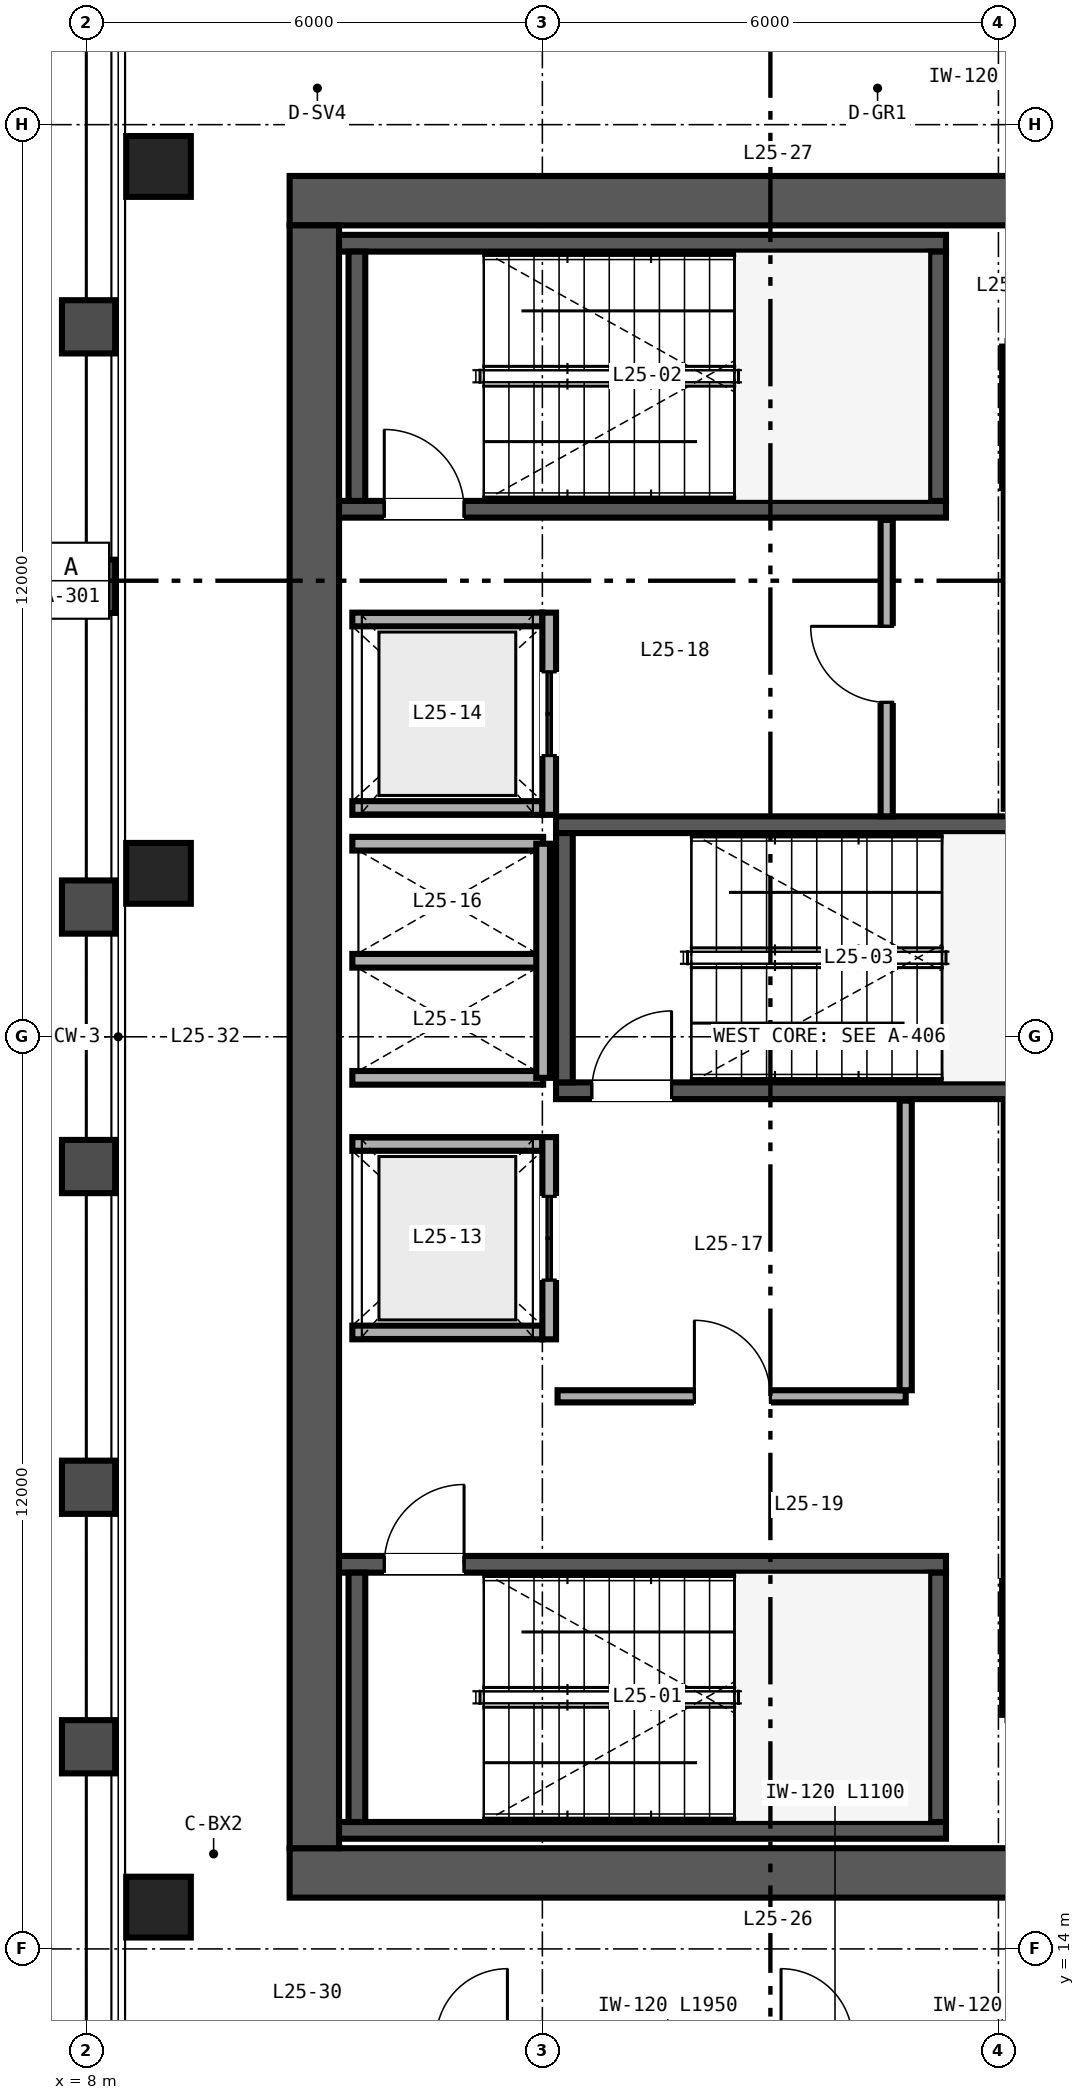
"""IFC4 building model, lengths in metres.
Left out: names, types, materials, properties, quantities, classifications, styles, units other than length and angle.
Written with IfcOpenShell. Run it as: python <this file> out.ifc"""

import sys

from ifc_helpers import new_model, si_unit, direction, frame, frame_2d, origin, origin_2d, place, context, subcontext, project, spatial, rectangle, hollow_rectangle, extrude, source, transform, mapped, element, fill, save


model = new_model("IFC4")
c1 = context("Model", 3, precision=1e-05, world=origin(), true_north=direction((0.0, 1.0)))
c2 = subcontext(c1, "Body", "Model", "MODEL_VIEW")
j1 = project(units=[si_unit("LENGTHUNIT", "METRE"), si_unit("PLANEANGLEUNIT", "RADIAN")], contexts=[c1])
p1 = place(None, origin())
s1 = spatial("IfcSite", under=j1, at=p1, CompositionType="ELEMENT")
p2 = place(p1, origin())
s2 = spatial("IfcBuilding", under=s1, at=p2, CompositionType="ELEMENT")
p3 = place(p2, frame((0.0, 0.0, 104.4)))
s3 = spatial("IfcBuildingStorey", under=s2, at=p3, CompositionType="ELEMENT", Elevation=104.4)
p4 = place(p3, frame((10.675, 15.0, 0.0), z_axis=(0.0, 0.0, 1.0), x_axis=(1.0, 0.0, 0.0)))
e1 = element("IfcWall", 1, at=p4, inside=s3, PredefinedType="SHEAR", context=c2, shape_type="SweptSolid", body=[
    extrude(rectangle(XDim=12.65, YDim=0.65, at=frame_2d((6.325, 0.0))), origin(), (0.0, 0.0, 1.0), 3.36),
])
p5 = place(p4, frame((10.225, 0.0, 0.0)))
e2 = element("IfcOpeningElement", 2, at=p5, cuts=e1, PredefinedType="OPENING", context=c2, shape_type="SweptSolid", body=[
    extrude(rectangle(XDim=1.0, YDim=2.15, at=frame_2d((0.5, 1.075))), frame((0.0, 0.335, 0.0), z_axis=(0.0, -1.0, 0.0), x_axis=(1.0, 0.0, 0.0)), (0.0, 0.0, 1.0), 0.67),
])
p6 = place(p3, frame((10.675, 37.0, 0.0), z_axis=(0.0, 0.0, 1.0), x_axis=(1.0, 0.0, 0.0)))
e3 = element("IfcWall", 3, at=p6, inside=s3, PredefinedType="SHEAR", context=c2, shape_type="SweptSolid", body=[
    extrude(rectangle(XDim=12.65, YDim=0.65, at=frame_2d((6.325, 0.0))), origin(), (0.0, 0.0, 1.0), 3.36),
])
p7 = place(p6, frame((10.425, 0.0, 0.0)))
e4 = element("IfcOpeningElement", 4, at=p7, cuts=e3, PredefinedType="OPENING", context=c2, shape_type="SweptSolid", body=[
    extrude(rectangle(XDim=1.0, YDim=2.15, at=frame_2d((0.5, 1.075))), frame((0.0, 0.335, 0.0), z_axis=(0.0, -1.0, 0.0), x_axis=(1.0, 0.0, 0.0)), (0.0, 0.0, 1.0), 0.67),
])
p8 = place(p3, frame((11.0, 15.325, 0.0), z_axis=(0.0, 0.0, 1.0), x_axis=(0.0, 1.0, 0.0)))
e5 = element("IfcWall", 5, at=p8, inside=s3, PredefinedType="SHEAR", context=c2, shape_type="SweptSolid", body=[
    extrude(rectangle(XDim=21.35, YDim=0.65, at=frame_2d((10.675, 0.0))), origin(), (0.0, 0.0, 1.0), 3.36),
])
p9 = place(p3, frame((11.325, 15.56, 0.0), z_axis=(0.0, 0.0, 1.0), x_axis=(1.0, 0.0, 0.0)))
e6 = element("IfcWall", 6, at=p9, inside=s3, PredefinedType="SHEAR", context=c2, shape_type="SweptSolid", body=[
    extrude(rectangle(XDim=7.985, YDim=0.22, at=frame_2d((3.993, 0.0))), origin(), (0.0, 0.0, 1.0), 3.4),
])
p10 = place(p3, frame((11.325, 19.06, 0.0), z_axis=(0.0, 0.0, 1.0), x_axis=(1.0, 0.0, 0.0)))
e7 = element("IfcWall", 7, at=p10, inside=s3, PredefinedType="SHEAR", context=c2, shape_type="SweptSolid", body=[
    extrude(rectangle(XDim=7.985, YDim=0.22, at=frame_2d((3.993, 0.0))), origin(), (0.0, 0.0, 1.0), 3.4),
])
p11 = place(p10, frame((0.595, 0.0, 0.0)))
e8 = element("IfcOpeningElement", 8, at=p11, cuts=e7, PredefinedType="OPENING", context=c2, shape_type="SweptSolid", body=[
    extrude(rectangle(XDim=1.05, YDim=2.15, at=frame_2d((0.525, 1.075))), frame((0.0, 0.12, 0.0), z_axis=(0.0, -1.0, 0.0), x_axis=(1.0, 0.0, 0.0)), (0.0, 0.0, 1.0), 0.24),
])
for number, where, z_axis, x_axis in (
    (9, (11.56, 15.67, 0.0), (0.0, 0.0, 1.0), (0.0, 1.0, 0.0)),
    (10, (19.2, 15.67, 0.0), (0.0, 0.0, 1.0), (0.0, 1.0, 0.0)),
):
    element("IfcWall", number, at=place(p3, frame(where, z_axis=z_axis, x_axis=x_axis)), inside=s3, PredefinedType="SHEAR", context=c2, shape_type="SweptSolid", body=[
        extrude(rectangle(XDim=3.28, YDim=0.22, at=frame_2d((1.64, 0.0))), origin(), (0.0, 0.0, 1.0), 3.4),
    ])
p12 = place(p3, frame((11.325, 32.94, 0.0), z_axis=(0.0, 0.0, 1.0), x_axis=(1.0, 0.0, 0.0)))
e11 = element("IfcWall", 11, at=p12, inside=s3, PredefinedType="SHEAR", context=c2, shape_type="SweptSolid", body=[
    extrude(rectangle(XDim=7.985, YDim=0.22, at=frame_2d((3.993, 0.0))), origin(), (0.0, 0.0, 1.0), 3.4),
])
p13 = place(p12, frame((0.595, 0.0, 0.0)))
e12 = element("IfcOpeningElement", 12, at=p13, cuts=e11, PredefinedType="OPENING", context=c2, shape_type="SweptSolid", body=[
    extrude(rectangle(XDim=1.05, YDim=2.15, at=frame_2d((0.525, 1.075))), frame((0.0, 0.12, 0.0), z_axis=(0.0, -1.0, 0.0), x_axis=(1.0, 0.0, 0.0)), (0.0, 0.0, 1.0), 0.24),
])
p14 = place(p3, frame((11.325, 36.44, 0.0), z_axis=(0.0, 0.0, 1.0), x_axis=(1.0, 0.0, 0.0)))
e13 = element("IfcWall", 13, at=p14, inside=s3, PredefinedType="SHEAR", context=c2, shape_type="SweptSolid", body=[
    extrude(rectangle(XDim=7.985, YDim=0.22, at=frame_2d((3.993, 0.0))), origin(), (0.0, 0.0, 1.0), 3.4),
])
for number, where, z_axis, x_axis in (
    (14, (11.56, 33.05, 0.0), (0.0, 0.0, 1.0), (0.0, 1.0, 0.0)),
    (15, (19.2, 33.05, 0.0), (0.0, 0.0, 1.0), (0.0, 1.0, 0.0)),
):
    element("IfcWall", number, at=place(p3, frame(where, z_axis=z_axis, x_axis=x_axis)), inside=s3, PredefinedType="SHEAR", context=c2, shape_type="SweptSolid", body=[
        extrude(rectangle(XDim=3.28, YDim=0.22, at=frame_2d((1.64, 0.0))), origin(), (0.0, 0.0, 1.0), 3.4),
    ])
p15 = place(p3, frame((14.18, 25.29, 0.0), z_axis=(0.0, 0.0, 1.0), x_axis=(1.0, 0.0, 0.0)))
e16 = element("IfcWall", 16, at=p15, inside=s3, PredefinedType="SHEAR", context=c2, shape_type="SweptSolid", body=[
    extrude(rectangle(XDim=8.495, YDim=0.22, at=frame_2d((4.248, 0.0))), origin(), (0.0, 0.0, 1.0), 3.4),
])
p16 = place(p15, frame((0.47, 0.0, 0.0)))
e17 = element("IfcOpeningElement", 17, at=p16, cuts=e16, PredefinedType="OPENING", context=c2, shape_type="SweptSolid", body=[
    extrude(rectangle(XDim=1.05, YDim=2.15, at=frame_2d((0.525, 1.075))), frame((0.0, 0.12, 0.0), z_axis=(0.0, -1.0, 0.0), x_axis=(1.0, 0.0, 0.0)), (0.0, 0.0, 1.0), 0.24),
])
p17 = place(p3, frame((14.18, 28.79, 0.0), z_axis=(0.0, 0.0, 1.0), x_axis=(1.0, 0.0, 0.0)))
e18 = element("IfcWall", 18, at=p17, inside=s3, PredefinedType="SHEAR", context=c2, shape_type="SweptSolid", body=[
    extrude(rectangle(XDim=8.495, YDim=0.22, at=frame_2d((4.248, 0.0))), origin(), (0.0, 0.0, 1.0), 3.4),
])
p18 = place(p3, frame((14.29, 25.4, 0.0), z_axis=(0.0, 0.0, 1.0), x_axis=(0.0, 1.0, 0.0)))
e19 = element("IfcWall", 19, at=p18, inside=s3, PredefinedType="SHEAR", context=c2, shape_type="SweptSolid", body=[
    extrude(rectangle(XDim=3.28, YDim=0.22, at=frame_2d((1.64, 0.0))), origin(), (0.0, 0.0, 1.0), 3.4),
])
m1 = source(origin(), c2, "Body", "SweptSolid", [
    extrude(hollow_rectangle(XDim=0.85, YDim=0.8, WallThickness=0.032, at=origin_2d()), origin(), (0.0, 0.0, 1.0), 3.36),
])
for number, where, z_axis, x_axis in (
    (20, (8.95, 14.55, 0.0), (0.0, 0.0, 1.0), (1.0, 0.0, 0.0)),
    (21, (8.95, 28.15, 0.0), (0.0, 0.0, 1.0), (1.0, 0.0, 0.0)),
    (22, (8.95, 37.45, 0.0), (0.0, 0.0, 1.0), (1.0, 0.0, 0.0)),
):
    element("IfcColumn", number, at=place(p3, frame(where, z_axis=z_axis, x_axis=x_axis)), inside=s3, PredefinedType="COLUMN", context=c2, shape_type="MappedRepresentation", body=[
        mapped(m1, transform((0.0, 0.0, 0.0), scale=1.0)),
    ])
p19 = place(p3, frame((20.16, 18.82, 0.0), z_axis=(0.0, 0.0, 1.0), x_axis=(0.0, 1.0, 0.0)))
e23 = element("IfcWall", 23, at=p19, inside=s3, PredefinedType="SOLIDWALL", context=c2, shape_type="SweptSolid", body=[
    extrude(rectangle(XDim=6.32, YDim=0.18, at=frame_2d((3.16, 0.0))), origin(), (0.0, 0.0, 1.0), 2.36),
])
p20 = place(p3, frame((20.16, 29.0, 0.0), z_axis=(0.0, 0.0, 1.0), x_axis=(0.0, 1.0, 0.0)))
e24 = element("IfcWall", 24, at=p20, inside=s3, PredefinedType="SOLIDWALL", context=c2, shape_type="SweptSolid", body=[
    extrude(rectangle(XDim=4.29, YDim=0.18, at=frame_2d((2.145, 0.0))), origin(), (0.0, 0.0, 1.0), 3.36),
])
for number, where, z_axis, x_axis in (
    (25, (11.5, 22.11, 0.0), (0.0, 0.0, 1.0), (1.0, 0.0, 0.0)),
    (26, (11.5, 24.59, 0.0), (0.0, 0.0, 1.0), (1.0, 0.0, 0.0)),
):
    element("IfcWall", number, at=place(p3, frame(where, z_axis=z_axis, x_axis=x_axis)), inside=s3, PredefinedType="SOLIDWALL", context=c2, shape_type="SweptSolid", body=[
        extrude(rectangle(XDim=2.5, YDim=0.18, at=frame_2d((1.25, 0.0))), origin(), (0.0, 0.0, 1.0), 3.36),
    ])
p21 = place(p3, frame((14.09, 22.02, 0.0), z_axis=(0.0, 0.0, 1.0), x_axis=(0.0, 1.0, 0.0)))
e27 = element("IfcWall", 27, at=p21, inside=s3, PredefinedType="SOLIDWALL", context=c2, shape_type="SweptSolid", body=[
    extrude(rectangle(XDim=2.66, YDim=0.18, at=frame_2d((1.33, 0.0))), origin(), (0.0, 0.0, 1.0), 3.36),
])
p22 = place(p21, frame((0.78, 0.0, 0.0)))
e28 = element("IfcOpeningElement", 28, at=p22, cuts=e27, PredefinedType="OPENING", context=c2, shape_type="SweptSolid", body=[
    extrude(rectangle(XDim=1.1, YDim=2.2, at=frame_2d((0.55, 1.1))), frame((0.0, 0.1, 0.0), z_axis=(0.0, -1.0, 0.0), x_axis=(1.0, 0.0, 0.0)), (0.0, 0.0, 1.0), 0.2),
])
for number, where, z_axis, x_axis in (
    (29, (11.5, 29.01, 0.0), (0.0, 0.0, 1.0), (1.0, 0.0, 0.0)),
    (30, (11.5, 31.49, 0.0), (0.0, 0.0, 1.0), (1.0, 0.0, 0.0)),
):
    element("IfcWall", number, at=place(p3, frame(where, z_axis=z_axis, x_axis=x_axis)), inside=s3, PredefinedType="SOLIDWALL", context=c2, shape_type="SweptSolid", body=[
        extrude(rectangle(XDim=2.5, YDim=0.18, at=frame_2d((1.25, 0.0))), origin(), (0.0, 0.0, 1.0), 3.36),
    ])
p23 = place(p3, frame((14.09, 28.92, 0.0), z_axis=(0.0, 0.0, 1.0), x_axis=(0.0, 1.0, 0.0)))
e31 = element("IfcWall", 31, at=p23, inside=s3, PredefinedType="SOLIDWALL", context=c2, shape_type="SweptSolid", body=[
    extrude(rectangle(XDim=2.66, YDim=0.18, at=frame_2d((1.33, 0.0))), origin(), (0.0, 0.0, 1.0), 3.36),
])
p24 = place(p23, frame((0.78, 0.0, 0.0)))
e32 = element("IfcOpeningElement", 32, at=p24, cuts=e31, PredefinedType="OPENING", context=c2, shape_type="SweptSolid", body=[
    extrude(rectangle(XDim=1.1, YDim=2.2, at=frame_2d((0.55, 1.1))), frame((0.0, 0.1, 0.0), z_axis=(0.0, -1.0, 0.0), x_axis=(1.0, 0.0, 0.0)), (0.0, 0.0, 1.0), 0.2),
])
for number, where, z_axis, x_axis in (
    (33, (11.5, 25.46, 0.0), (0.0, 0.0, 1.0), (1.0, 0.0, 0.0)),
    (34, (11.5, 27.0, 0.0), (0.0, 0.0, 1.0), (1.0, 0.0, 0.0)),
    (35, (11.5, 28.54, 0.0), (0.0, 0.0, 1.0), (1.0, 0.0, 0.0)),
):
    element("IfcWall", number, at=place(p3, frame(where, z_axis=z_axis, x_axis=x_axis)), inside=s3, PredefinedType="SOLIDWALL", context=c2, shape_type="SweptSolid", body=[
        extrude(rectangle(XDim=2.51, YDim=0.18, at=frame_2d((1.255, 0.0))), origin(), (0.0, 0.0, 1.0), 3.36),
    ])
p25 = place(p3, frame((14.01, 25.46, 0.0), z_axis=(0.0, 0.0, 1.0), x_axis=(0.0, 1.0, 0.0)))
e36 = element("IfcWall", 36, at=p25, inside=s3, PredefinedType="SOLIDWALL", context=c2, shape_type="SweptSolid", body=[
    extrude(rectangle(XDim=3.08, YDim=0.18, at=frame_2d((1.54, 0.0))), origin(), (0.0, 0.0, 1.0), 3.36),
])
p26 = place(p3, frame((14.2, 21.27, 0.0), z_axis=(0.0, 0.0, 1.0), x_axis=(1.0, 0.0, 0.0)))
e37 = element("IfcWall", 37, at=p26, inside=s3, PredefinedType="PARTITIONING", context=c2, shape_type="SweptSolid", body=[
    extrude(rectangle(XDim=4.58, YDim=0.16, at=frame_2d((2.29, 0.0))), origin(), (0.0, 0.0, 1.0), 3.36),
])
p27 = place(p26, frame((1.8, 0.0, 0.0)))
e38 = element("IfcOpeningElement", 38, at=p27, cuts=e37, PredefinedType="OPENING", context=c2, shape_type="SweptSolid", body=[
    extrude(rectangle(XDim=1.0, YDim=2.15, at=frame_2d((0.5, 1.075))), frame((0.0, 0.09, 0.0), z_axis=(0.0, -1.0, 0.0), x_axis=(1.0, 0.0, 0.0)), (0.0, 0.0, 1.0), 0.18),
])
p28 = place(p3, frame((18.78, 21.35, 0.0), z_axis=(0.0, 0.0, 1.0), x_axis=(0.0, 1.0, 0.0)))
e39 = element("IfcWall", 39, at=p28, inside=s3, PredefinedType="PARTITIONING", context=c2, shape_type="SweptSolid", body=[
    extrude(rectangle(XDim=3.81, YDim=0.16, at=frame_2d((1.905, 0.0))), origin(), (0.0, 0.0, 1.0), 3.36),
])
p29 = place(p3, frame((18.53, 28.9, 0.0), z_axis=(0.0, 0.0, 1.0), x_axis=(0.0, 1.0, 0.0)))
e40 = element("IfcWall", 40, at=p29, inside=s3, PredefinedType="PARTITIONING", context=c2, shape_type="SweptSolid", body=[
    extrude(rectangle(XDim=3.9, YDim=0.16, at=frame_2d((1.95, 0.0))), origin(), (0.0, 0.0, 1.0), 3.36),
])
p30 = place(p29, frame((1.5, 0.0, 0.0)))
e41 = element("IfcOpeningElement", 41, at=p30, cuts=e40, PredefinedType="OPENING", context=c2, shape_type="SweptSolid", body=[
    extrude(rectangle(XDim=1.0, YDim=2.15, at=frame_2d((0.5, 1.075))), frame((0.0, 0.09, 0.0), z_axis=(0.0, -1.0, 0.0), x_axis=(1.0, 0.0, 0.0)), (0.0, 0.0, 1.0), 0.18),
])
p31 = place(p3, frame((20.12, 17.08, 0.0), z_axis=(0.0, 0.0, 1.0), x_axis=(0.0, 1.0, 0.0)))
e42 = element("IfcWall", 42, at=p31, inside=s3, PredefinedType="PARTITIONING", context=c2, shape_type="SweptSolid", body=[
    extrude(rectangle(XDim=1.76, YDim=0.142, at=frame_2d((0.88, 0.0))), origin(), (0.0, 0.0, 1.0), 3.36),
])
p32 = place(p3, frame((20.12, 33.22, 0.0), z_axis=(0.0, 0.0, 1.0), x_axis=(0.0, 1.0, 0.0)))
e43 = element("IfcWall", 43, at=p32, inside=s3, PredefinedType="PARTITIONING", context=c2, shape_type="SweptSolid", body=[
    extrude(rectangle(XDim=1.86, YDim=0.142, at=frame_2d((0.93, 0.0))), origin(), (0.0, 0.0, 1.0), 3.36),
])
m2 = source(origin(), c2, "Body", "SweptSolid", [
    extrude(rectangle(XDim=1.05, YDim=2.15, at=frame_2d((0.525, 1.075))), frame((0.0, 0.025, 0.0), z_axis=(0.0, -1.0, 0.0), x_axis=(1.0, 0.0, 0.0)), (0.0, 0.0, 1.0), 0.05),
])
p33 = place(p11, origin())
e44 = element("IfcDoor", 44, at=p33, inside=s3, OperationType="SINGLE_SWING_RIGHT", PredefinedType="DOOR", context=c2, shape_type="MappedRepresentation", body=[
    mapped(m2, transform((0.0, 0.0, 0.0), scale=1.0)),
])
fill(e8, e44)
p34 = place(p13, origin())
e45 = element("IfcDoor", 45, at=p34, inside=s3, OperationType="SINGLE_SWING_LEFT", PredefinedType="DOOR", context=c2, shape_type="MappedRepresentation", body=[
    mapped(m2, transform((0.0, 0.0, 0.0), scale=1.0)),
])
fill(e12, e45)
p35 = place(p16, origin())
e46 = element("IfcDoor", 46, at=p35, inside=s3, OperationType="SINGLE_SWING_RIGHT", PredefinedType="DOOR", context=c2, shape_type="MappedRepresentation", body=[
    mapped(m2, transform((0.0, 0.0, 0.0), scale=1.0)),
])
fill(e17, e46)
m3 = source(origin(), c2, "Body", "SweptSolid", [
    extrude(rectangle(XDim=1.1, YDim=2.2, at=frame_2d((0.55, 1.1))), frame((0.0, 0.025, 0.0), z_axis=(0.0, -1.0, 0.0), x_axis=(1.0, 0.0, 0.0)), (0.0, 0.0, 1.0), 0.05),
])
p36 = place(p22, origin())
e47 = element("IfcDoor", 47, at=p36, inside=s3, OperationType="DOUBLE_DOOR_SLIDING", PredefinedType="DOOR", context=c2, shape_type="MappedRepresentation", body=[
    mapped(m3, transform((0.0, 0.0, 0.0), scale=1.0)),
])
fill(e28, e47)
p37 = place(p24, origin())
e48 = element("IfcDoor", 48, at=p37, inside=s3, OperationType="DOUBLE_DOOR_SLIDING", PredefinedType="DOOR", context=c2, shape_type="MappedRepresentation", body=[
    mapped(m3, transform((0.0, 0.0, 0.0), scale=1.0)),
])
fill(e32, e48)
m4 = source(origin(), c2, "Body", "SweptSolid", [
    extrude(rectangle(XDim=1.0, YDim=2.15, at=frame_2d((0.5, 1.075))), frame((0.0, 0.025, 0.0), z_axis=(0.0, -1.0, 0.0), x_axis=(1.0, 0.0, 0.0)), (0.0, 0.0, 1.0), 0.05),
])
p38 = place(p27, origin())
e49 = element("IfcDoor", 49, at=p38, inside=s3, OperationType="SINGLE_SWING_LEFT", PredefinedType="DOOR", context=c2, shape_type="MappedRepresentation", body=[
    mapped(m4, transform((0.0, 0.0, 0.0), scale=1.0)),
])
fill(e38, e49)
p39 = place(p30, origin())
e50 = element("IfcDoor", 50, at=p39, inside=s3, OperationType="SINGLE_SWING_RIGHT", PredefinedType="DOOR", context=c2, shape_type="MappedRepresentation", body=[
    mapped(m4, transform((0.0, 0.0, 0.0), scale=1.0)),
])
fill(e41, e50)
save(model, sys.argv[1])
